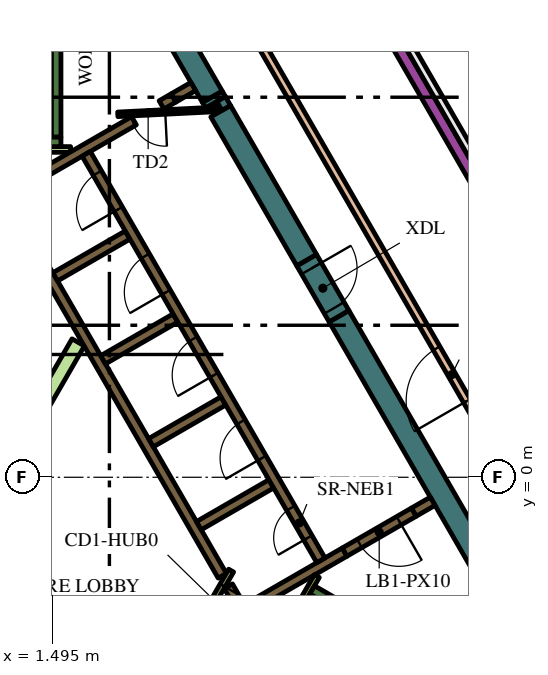
"""IFC4 building model, lengths in metres.
Left out: names, types, materials, properties, quantities, classifications, styles, units other than length and angle.
Written with IfcOpenShell. Run it as: python <this file> out.ifc"""

import sys

from ifc_helpers import new_model, si_unit, direction, frame, frame_2d, origin, place, context, subcontext, project, spatial, polyline, rectangle, outline, extrude, element, fill, save


model = new_model("IFC4")
c1 = context("Model", 3, precision=1e-05, world=origin(), true_north=direction((0.0, 1.0)))
c2 = subcontext(c1, "Body", "Model", "MODEL_VIEW")
j1 = project(units=[si_unit("LENGTHUNIT", "METRE"), si_unit("PLANEANGLEUNIT", "RADIAN")], contexts=[c1])
p1 = place(None, origin())
s1 = spatial("IfcSite", under=j1, at=p1, CompositionType="ELEMENT")
p2 = place(p1, origin())
s2 = spatial("IfcBuilding", under=s1, at=p2, CompositionType="ELEMENT")
p3 = place(p2, frame((0.0, 0.0, 344.4)))
s3 = spatial("IfcBuildingStorey", under=s2, at=p3, CompositionType="ELEMENT", Elevation=344.4)
p4 = place(p3, frame((9.042, 4.239, 0.0), z_axis=(0.0, 0.0, 1.0), x_axis=(0.500005785455, -0.866022063525, 0.0)))
e1 = element("IfcWall", 1, at=p4, inside=s3, PredefinedType="SOLIDWALL", context=c2, shape_type="SweptSolid", body=[
    extrude(rectangle(XDim=12.406, YDim=0.6, at=frame_2d((6.203, 0.0))), origin(), (0.0, 0.0, 1.0), 4.2),
])
p5 = place(p3, frame((5.709, 10.012, 0.0), z_axis=(0.0, 0.0, 1.0), x_axis=(0.500399834964, -0.865794435861, 0.0)))
e2 = element("IfcWall", 2, at=p5, inside=s3, PredefinedType="SOLIDWALL", context=c2, shape_type="SweptSolid", body=[
    extrude(rectangle(XDim=0.166, YDim=0.6, at=frame_2d((0.083, 0.0))), origin(), (0.0, 0.0, 1.0), 4.2),
])
p6 = place(p3, frame((5.928, 9.633, 0.0), z_axis=(0.0, 0.0, 1.0), x_axis=(0.499983823482, -0.8660347431, 0.0)))
e3 = element("IfcWall", 3, at=p6, inside=s3, PredefinedType="SOLIDWALL", context=c2, shape_type="SweptSolid", body=[
    extrude(rectangle(XDim=4.528, YDim=0.6, at=frame_2d((2.264, 0.0))), origin(), (0.0, 0.0, 1.0), 4.2),
])
p7 = place(p3, origin())
e4 = element("IfcWall", 4, at=p7, inside=s3, PredefinedType="SOLIDWALL", context=c2, shape_type="SweptSolid", body=[
    extrude(outline(polyline([(6.053, 10.016), (6.187, 9.784), (5.961, 9.654), (5.827, 9.886), (6.053, 10.016)])), origin(), (0.0, 0.0, 1.0), 4.2),
])
p8 = place(p3, frame((1.989, 16.456, 0.0), z_axis=(0.0, 0.0, 1.0), x_axis=(0.499990476767, -0.866030901956, 0.0)))
e5 = element("IfcWall", 5, at=p8, inside=s3, PredefinedType="SOLIDWALL", context=c2, shape_type="SweptSolid", body=[
    extrude(rectangle(XDim=7.438, YDim=0.6, at=frame_2d((3.719, 0.0))), origin(), (0.0, 0.0, 1.0), 4.2),
])
p9 = place(p3, frame((8.334, -2.964, 0.0), z_axis=(0.0, 0.0, 1.0), x_axis=(0.866016039709, -0.500016218704, 0.0)))
e6 = element("IfcWall", 6, at=p9, inside=s3, PredefinedType="SOLIDWALL", context=c2, shape_type="SweptSolid", body=[
    extrude(rectangle(XDim=7.05, YDim=0.25, at=frame_2d((3.525, 0.0))), origin(), (0.0, 0.0, 1.0), 4.2),
])
p10 = place(p3, frame((8.168, -3.503, 0.0), z_axis=(0.0, 0.0, 1.0), x_axis=(0.49972245349, 0.866185586049, 0.0)))
e7 = element("IfcWall", 7, at=p10, inside=s3, PredefinedType="SOLIDWALL", context=c2, shape_type="SweptSolid", body=[
    extrude(rectangle(XDim=0.425, YDim=0.25, at=frame_2d((0.212, 0.0))), origin(), (0.0, 0.0, 1.0), 4.2),
])
p11 = place(p3, frame((1.6, 8.95, 0.0), z_axis=(0.0, 0.0, 1.0), x_axis=(0.0, 1.0, 0.0)))
e8 = element("IfcWall", 8, at=p11, inside=s3, PredefinedType="SOLIDWALL", context=c2, shape_type="SweptSolid", body=[
    extrude(rectangle(XDim=6.8, YDim=0.25, at=frame_2d((3.4, 0.0))), origin(), (0.0, 0.0, 1.0), 4.2),
])
p12 = place(p3, frame((1.05, 8.825, 0.0), z_axis=(0.0, 0.0, 1.0), x_axis=(1.0, 0.0, 0.0)))
e9 = element("IfcWall", 9, at=p12, inside=s3, PredefinedType="SOLIDWALL", context=c2, shape_type="SweptSolid", body=[
    extrude(rectangle(XDim=0.675, YDim=0.25, at=frame_2d((0.337, 0.0))), origin(), (0.0, 0.0, 1.0), 4.2),
])
p13 = place(p3, frame((9.19, -1.969, 0.0), z_axis=(0.0, 0.0, 1.0), x_axis=(-0.866057109641, -0.499945079824, 0.0)))
e10 = element("IfcWall", 10, at=p13, inside=s3, PredefinedType="SOLIDWALL", context=c2, shape_type="SweptSolid", body=[
    extrude(rectangle(XDim=3.291, YDim=0.25, at=frame_2d((1.646, 0.0))), origin(), (0.0, 0.0, 1.0), 4.2),
])
p14 = place(p3, frame((6.13, -2.867, 0.0), z_axis=(0.0, 0.0, 1.0), x_axis=(0.500160776593, -0.865932559475, 0.0)))
e11 = element("IfcWall", 11, at=p14, inside=s3, PredefinedType="SOLIDWALL", context=c2, shape_type="SweptSolid", body=[
    extrude(rectangle(XDim=0.627, YDim=0.25, at=frame_2d((0.313, 0.0))), origin(), (0.0, 0.0, 1.0), 4.2),
])
p15 = place(p3, frame((11.507, -0.631, 0.0), z_axis=(0.0, 0.0, 1.0), x_axis=(-0.866093731455, -0.499881634324, 0.0)))
e12 = element("IfcWall", 12, at=p15, inside=s3, PredefinedType="SOLIDWALL", context=c2, shape_type="SweptSolid", body=[
    extrude(rectangle(XDim=0.575, YDim=0.25, at=frame_2d((0.288, 0.0))), origin(), (0.0, 0.0, 1.0), 4.2),
])
p16 = place(p3, frame((3.647, 9.38, 0.0), z_axis=(0.0, 0.0, 1.0), x_axis=(-0.866027868628, -0.499995730742, 0.0)))
e13 = element("IfcWall", 13, at=p16, inside=s3, PredefinedType="SOLIDWALL", context=c2, shape_type="SweptSolid", body=[
    extrude(rectangle(XDim=4.099, YDim=0.25, at=frame_2d((2.049, 0.0))), origin(), (0.0, 0.0, 1.0), 4.2),
])
p17 = place(p3, frame((5.97, -2.591, 0.0), z_axis=(0.0, 0.0, 1.0), x_axis=(-0.499994469932, 0.866028596547, 0.0)))
e14 = element("IfcWall", 14, at=p17, inside=s3, PredefinedType="SOLIDWALL", context=c2, shape_type="SweptSolid", body=[
    extrude(rectangle(XDim=10.488, YDim=0.25, at=frame_2d((5.244, 0.0))), origin(), (0.0, 0.0, 1.0), 4.2),
])
p18 = place(p3, frame((1.574, 5.274, 0.0), z_axis=(0.0, 0.0, 1.0), x_axis=(0.866028486751, 0.499994660107, 0.0)))
e15 = element("IfcWall", 15, at=p18, inside=s3, PredefinedType="SOLIDWALL", context=c2, shape_type="SweptSolid", body=[
    extrude(rectangle(XDim=2.2, YDim=0.25, at=frame_2d((1.1, 0.0))), origin(), (0.0, 0.0, 1.0), 4.2),
])
for number, where, z_axis, x_axis in (
    (16, (2.834, 3.091, 0.0), (0.0, 0.0, 1.0), (0.866, 0.5, 0.0)),
    (17, (4.094, 0.909, 0.0), (0.0, 0.0, 1.0), (0.866, 0.5, 0.0)),
    (18, (5.354, -1.274, 0.0), (0.0, 0.0, 1.0), (0.866, 0.5, 0.0)),
):
    element("IfcWall", number, at=place(p3, frame(where, z_axis=z_axis, x_axis=x_axis)), inside=s3, PredefinedType="SOLIDWALL", context=c2, shape_type="SweptSolid", body=[
        extrude(rectangle(XDim=2.2, YDim=0.25, at=frame_2d((1.1, 0.0))), origin(), (0.0, 0.0, 1.0), 4.2),
    ])
p19 = place(p3, frame((4.688, 9.981, 0.0), z_axis=(0.0, 0.0, 1.0), x_axis=(-0.865974312977, -0.500088481434, 0.0)))
e19 = element("IfcWall", 19, at=p19, inside=s3, PredefinedType="SOLIDWALL", context=c2, shape_type="SweptSolid", body=[
    extrude(rectangle(XDim=0.366, YDim=0.25, at=frame_2d((0.183, 0.0))), origin(), (0.0, 0.0, 1.0), 4.2),
])
p20 = place(p3, frame((4.689, 9.982, 0.0), z_axis=(0.0, 0.0, 1.0), x_axis=(0.865947592822, 0.500134748329, 0.0)))
e20 = element("IfcWall", 20, at=p20, inside=s3, PredefinedType="SOLIDWALL", context=c2, shape_type="SweptSolid", body=[
    extrude(rectangle(XDim=0.598, YDim=0.25, at=frame_2d((0.299, 0.0))), origin(), (0.0, 0.0, 1.0), 4.2),
])
p21 = place(p3, frame((1.05, 8.625, 0.0), z_axis=(0.0, 0.0, 1.0), x_axis=(1.0, 0.0, 0.0)))
e21 = element("IfcWall", 21, at=p21, inside=s3, PredefinedType="PARTITIONING", context=c2, shape_type="SweptSolid", body=[
    extrude(rectangle(XDim=0.929, YDim=0.15, at=frame_2d((0.464, 0.0))), origin(), (0.0, 0.0, 1.0), 3.3),
])
p22 = place(p3, frame((8.459, -2.599, 0.0), z_axis=(0.0, 0.0, 1.0), x_axis=(-0.500041054325, -0.866001699761, 0.0)))
e22 = element("IfcWall", 22, at=p22, inside=s3, PredefinedType="PARTITIONING", context=c2, shape_type="SweptSolid", body=[
    extrude(rectangle(XDim=0.929, YDim=0.15, at=frame_2d((0.464, 0.0))), origin(), (0.0, 0.0, 1.0), 4.2),
])
e23 = element("IfcWall", 23, at=p7, inside=s3, PredefinedType="PARTITIONING", context=c2, shape_type="SweptSolid", body=[
    extrude(outline(polyline([(2.017, 3.643), (2.342, 3.456), (-1.822, -3.756), (-2.147, -3.568), (2.017, 3.643)])), origin(), (0.0, 0.0, 1.0), 3.3),
])
p23 = place(p3, frame((8.565, -2.185, 0.0), z_axis=(0.0, 0.0, 1.0), x_axis=(-0.499997954832, 0.866026584559, 0.0)))
e24 = element("IfcWall", 24, at=p23, inside=s3, PredefinedType="SOLIDWALL", context=c2, shape_type="SweptSolid", body=[
    extrude(rectangle(XDim=12.35, YDim=0.25, at=frame_2d((6.175, 0.0))), origin(), (0.0, 0.0, 1.0), 4.2),
])
p24 = place(p23, frame((0.685, 0.0, 0.0)))
e25 = element("IfcOpeningElement", 25, at=p24, cuts=e24, PredefinedType="OPENING", context=c2, shape_type="SweptSolid", body=[
    extrude(rectangle(XDim=0.9, YDim=2.1, at=frame_2d((0.45, 1.05))), frame((0.0, 0.135, 0.0), z_axis=(0.0, -1.0, 0.0), x_axis=(1.0, 0.0, 0.0)), (0.0, 0.0, 1.0), 0.27),
])
p25 = place(p23, frame((3.105, 0.0, 0.0)))
e26 = element("IfcOpeningElement", 26, at=p25, cuts=e24, PredefinedType="OPENING", context=c2, shape_type="SweptSolid", body=[
    extrude(rectangle(XDim=1.1, YDim=2.1, at=frame_2d((0.55, 1.05))), frame((0.0, 0.135, 0.0), z_axis=(0.0, -1.0, 0.0), x_axis=(1.0, 0.0, 0.0)), (0.0, 0.0, 1.0), 0.27),
])
p26 = place(p23, frame((5.625, 0.0, 0.0)))
e27 = element("IfcOpeningElement", 27, at=p26, cuts=e24, PredefinedType="OPENING", context=c2, shape_type="SweptSolid", body=[
    extrude(rectangle(XDim=1.1, YDim=2.1, at=frame_2d((0.55, 1.05))), frame((0.0, 0.135, 0.0), z_axis=(0.0, -1.0, 0.0), x_axis=(1.0, 0.0, 0.0)), (0.0, 0.0, 1.0), 0.27),
])
p27 = place(p23, frame((8.145, 0.0, 0.0)))
e28 = element("IfcOpeningElement", 28, at=p27, cuts=e24, PredefinedType="OPENING", context=c2, shape_type="SweptSolid", body=[
    extrude(rectangle(XDim=1.1, YDim=2.1, at=frame_2d((0.55, 1.05))), frame((0.0, 0.135, 0.0), z_axis=(0.0, -1.0, 0.0), x_axis=(1.0, 0.0, 0.0)), (0.0, 0.0, 1.0), 0.27),
])
p28 = place(p23, frame((10.665, 0.0, 0.0)))
e29 = element("IfcOpeningElement", 29, at=p28, cuts=e24, PredefinedType="OPENING", context=c2, shape_type="SweptSolid", body=[
    extrude(rectangle(XDim=1.1, YDim=2.1, at=frame_2d((0.55, 1.05))), frame((0.0, 0.135, 0.0), z_axis=(0.0, -1.0, 0.0), x_axis=(1.0, 0.0, 0.0)), (0.0, 0.0, 1.0), 0.27),
])
p29 = place(p3, frame((5.917, 9.684, 0.0), z_axis=(0.0, 0.0, 1.0), x_axis=(-0.998758194515, -0.049820366212, 0.0)))
e30 = element("IfcWall", 30, at=p29, inside=s3, PredefinedType="PARTITIONING", context=c2, shape_type="SweptSolid", body=[
    extrude(rectangle(XDim=2.7, YDim=0.12, at=frame_2d((1.35, 0.0))), origin(), (0.0, 0.0, 1.0), 3.3),
])
p30 = place(p29, frame((1.45, 0.0, 0.0)))
e31 = element("IfcOpeningElement", 31, at=p30, cuts=e30, PredefinedType="OPENING", context=c2, shape_type="SweptSolid", body=[
    extrude(rectangle(XDim=0.9, YDim=2.1, at=frame_2d((0.45, 1.05))), frame((0.0, 0.07, 0.0), z_axis=(0.0, -1.0, 0.0), x_axis=(1.0, 0.0, 0.0)), (0.0, 0.0, 1.0), 0.14),
])
p31 = place(p3, frame((6.203, -2.456, 0.0), z_axis=(0.0, 0.0, 1.0), x_axis=(-0.500043961785, -0.866000020948, 0.0)))
e32 = element("IfcWall", 32, at=p31, inside=s3, PredefinedType="PARTITIONING", context=c2, shape_type="SweptSolid", body=[
    extrude(rectangle(XDim=1.95, YDim=0.15, at=frame_2d((0.975, 0.0))), origin(), (0.0, 0.0, 1.0), 4.2),
])
p32 = place(p31, frame((0.45, 0.0, 0.0)))
e33 = element("IfcOpeningElement", 33, at=p32, cuts=e32, PredefinedType="OPENING", context=c2, shape_type="SweptSolid", body=[
    extrude(rectangle(XDim=0.9, YDim=2.1, at=frame_2d((0.45, 1.05))), frame((0.0, 0.085, 0.0), z_axis=(0.0, -1.0, 0.0), x_axis=(1.0, 0.0, 0.0)), (0.0, 0.0, 1.0), 0.17),
])
p33 = place(p3, frame((11.009, -0.919, 0.0), z_axis=(0.0, 0.0, 1.0), x_axis=(-0.866059744384, -0.49994051562, 0.0)))
e34 = element("IfcWall", 34, at=p33, inside=s3, PredefinedType="SOLIDWALL", context=c2, shape_type="SweptSolid", body=[
    extrude(rectangle(XDim=2.1, YDim=0.25, at=frame_2d((1.05, 0.0))), origin(), (0.0, 0.0, 1.0), 4.2),
])
p34 = place(p33, frame((0.45, 0.0, 0.0)))
e35 = element("IfcOpeningElement", 35, at=p34, cuts=e34, PredefinedType="OPENING", context=c2, shape_type="SweptSolid", body=[
    extrude(rectangle(XDim=1.2, YDim=2.1, at=frame_2d((0.6, 1.05))), frame((0.0, 0.135, 0.0), z_axis=(0.0, -1.0, 0.0), x_axis=(1.0, 0.0, 0.0)), (0.0, 0.0, 1.0), 0.27),
])
p35 = place(p3, frame((8.192, 5.711, 0.0), z_axis=(0.0, 0.0, 1.0), x_axis=(0.500062241894, -0.865989465428, 0.0)))
e36 = element("IfcWall", 36, at=p35, inside=s3, PredefinedType="SOLIDWALL", context=c2, shape_type="SweptSolid", body=[
    extrude(rectangle(XDim=1.7, YDim=0.6, at=frame_2d((0.85, 0.0))), origin(), (0.0, 0.0, 1.0), 4.2),
])
p36 = place(p35, frame((0.25, 0.0, 0.0)))
e37 = element("IfcOpeningElement", 37, at=p36, cuts=e36, PredefinedType="OPENING", context=c2, shape_type="SweptSolid", body=[
    extrude(rectangle(XDim=1.2, YDim=2.1, at=frame_2d((0.6, 1.05))), frame((0.0, 0.31, 0.0), z_axis=(0.0, -1.0, 0.0), x_axis=(1.0, 0.0, 0.0)), (0.0, 0.0, 1.0), 0.62),
])
p37 = place(p3, frame((17.234, -6.35, 0.0), z_axis=(0.0, 0.0, 1.0), x_axis=(-0.499998496574, 0.866026271786, 0.0)))
e38 = element("IfcWall", 38, at=p37, inside=s3, PredefinedType="PARTITIONING", context=c2, shape_type="SweptSolid", body=[
    extrude(rectangle(XDim=20.9, YDim=0.2, at=frame_2d((10.45, 0.0))), origin(), (0.0, 0.0, 1.0), 3.3),
])
p38 = place(p37, frame((9.65, 0.0, 0.0)))
e39 = element("IfcOpeningElement", 39, at=p38, cuts=e38, PredefinedType="OPENING", context=c2, shape_type="SweptSolid", body=[
    extrude(rectangle(XDim=1.6, YDim=2.1, at=frame_2d((0.8, 1.05))), frame((0.0, 0.11, 0.0), z_axis=(0.0, -1.0, 0.0), x_axis=(1.0, 0.0, 0.0)), (0.0, 0.0, 1.0), 0.22),
])
p39 = place(p3, frame((18.181, -1.79, 0.0), z_axis=(0.0, 0.0, 1.0), x_axis=(-0.500002158106, 0.866024157798, 0.0)))
e40 = element("IfcWall", 40, at=p39, inside=s3, PredefinedType="SOLIDWALL", context=c2, shape_type="SweptSolid", body=[
    extrude(rectangle(XDim=21.282, YDim=0.3, at=frame_2d((10.641, 0.0))), origin(), (0.0, 0.0, 1.0), 3.3),
])
p40 = place(p24, origin())
e41 = element("IfcDoor", 41, at=p40, inside=s3, OperationType="SINGLE_SWING_LEFT", PredefinedType="DOOR", context=c2, shape_type="SweptSolid", body=[
    extrude(rectangle(XDim=0.9, YDim=2.1, at=frame_2d((0.45, 1.05))), frame((0.0, 0.025, 0.0), z_axis=(0.0, -1.0, 0.0), x_axis=(1.0, 0.0, 0.0)), (0.0, 0.0, 1.0), 0.05),
])
fill(e25, e41)
p41 = place(p25, origin())
e42 = element("IfcDoor", 42, at=p41, inside=s3, OperationType="DOUBLE_DOOR_SLIDING", PredefinedType="DOOR", context=c2, shape_type="SweptSolid", body=[
    extrude(rectangle(XDim=1.1, YDim=2.1, at=frame_2d((0.55, 1.05))), frame((0.0, 0.025, 0.0), z_axis=(0.0, -1.0, 0.0), x_axis=(1.0, 0.0, 0.0)), (0.0, 0.0, 1.0), 0.05),
])
fill(e26, e42)
p42 = place(p26, origin())
e43 = element("IfcDoor", 43, at=p42, inside=s3, OperationType="DOUBLE_DOOR_SLIDING", PredefinedType="DOOR", context=c2, shape_type="SweptSolid", body=[
    extrude(rectangle(XDim=1.1, YDim=2.1, at=frame_2d((0.55, 1.05))), frame((0.0, 0.025, 0.0), z_axis=(0.0, -1.0, 0.0), x_axis=(1.0, 0.0, 0.0)), (0.0, 0.0, 1.0), 0.05),
])
fill(e27, e43)
p43 = place(p27, origin())
e44 = element("IfcDoor", 44, at=p43, inside=s3, OperationType="DOUBLE_DOOR_SLIDING", PredefinedType="DOOR", context=c2, shape_type="SweptSolid", body=[
    extrude(rectangle(XDim=1.1, YDim=2.1, at=frame_2d((0.55, 1.05))), frame((0.0, 0.025, 0.0), z_axis=(0.0, -1.0, 0.0), x_axis=(1.0, 0.0, 0.0)), (0.0, 0.0, 1.0), 0.05),
])
fill(e28, e44)
p44 = place(p28, origin())
e45 = element("IfcDoor", 45, at=p44, inside=s3, OperationType="DOUBLE_DOOR_SLIDING", PredefinedType="DOOR", context=c2, shape_type="SweptSolid", body=[
    extrude(rectangle(XDim=1.1, YDim=2.1, at=frame_2d((0.55, 1.05))), frame((0.0, 0.025, 0.0), z_axis=(0.0, -1.0, 0.0), x_axis=(1.0, 0.0, 0.0)), (0.0, 0.0, 1.0), 0.05),
])
fill(e29, e45)
p45 = place(p30, origin())
e46 = element("IfcDoor", 46, at=p45, inside=s3, OperationType="SINGLE_SWING_LEFT", PredefinedType="DOOR", context=c2, shape_type="SweptSolid", body=[
    extrude(rectangle(XDim=0.9, YDim=2.1, at=frame_2d((0.45, 1.05))), frame((0.0, 0.025, 0.0), z_axis=(0.0, -1.0, 0.0), x_axis=(1.0, 0.0, 0.0)), (0.0, 0.0, 1.0), 0.05),
])
fill(e31, e46)
p46 = place(p32, origin())
e47 = element("IfcDoor", 47, at=p46, inside=s3, OperationType="SINGLE_SWING_LEFT", PredefinedType="DOOR", context=c2, shape_type="SweptSolid", body=[
    extrude(rectangle(XDim=0.9, YDim=2.1, at=frame_2d((0.45, 1.05))), frame((0.0, 0.025, 0.0), z_axis=(0.0, -1.0, 0.0), x_axis=(1.0, 0.0, 0.0)), (0.0, 0.0, 1.0), 0.05),
])
fill(e33, e47)
p47 = place(p34, origin())
e48 = element("IfcDoor", 48, at=p47, inside=s3, OperationType="SINGLE_SWING_LEFT", PredefinedType="DOOR", context=c2, shape_type="SweptSolid", body=[
    extrude(rectangle(XDim=1.2, YDim=2.1, at=frame_2d((0.6, 1.05))), frame((0.0, 0.025, 0.0), z_axis=(0.0, -1.0, 0.0), x_axis=(1.0, 0.0, 0.0)), (0.0, 0.0, 1.0), 0.05),
])
fill(e35, e48)
p48 = place(p36, origin())
e49 = element("IfcDoor", 49, at=p48, inside=s3, OperationType="SINGLE_SWING_LEFT", PredefinedType="DOOR", context=c2, shape_type="SweptSolid", body=[
    extrude(rectangle(XDim=1.2, YDim=2.1, at=frame_2d((0.6, 1.05))), frame((0.0, 0.025, 0.0), z_axis=(0.0, -1.0, 0.0), x_axis=(1.0, 0.0, 0.0)), (0.0, 0.0, 1.0), 0.05),
])
fill(e37, e49)
p49 = place(p38, origin())
e50 = element("IfcDoor", 50, at=p49, inside=s3, OperationType="DOUBLE_DOOR_SINGLE_SWING", PredefinedType="DOOR", context=c2, shape_type="SweptSolid", body=[
    extrude(rectangle(XDim=1.6, YDim=2.1, at=frame_2d((0.8, 1.05))), frame((0.0, 0.025, 0.0), z_axis=(0.0, -1.0, 0.0), x_axis=(1.0, 0.0, 0.0)), (0.0, 0.0, 1.0), 0.05),
])
fill(e39, e50)
save(model, sys.argv[1])
